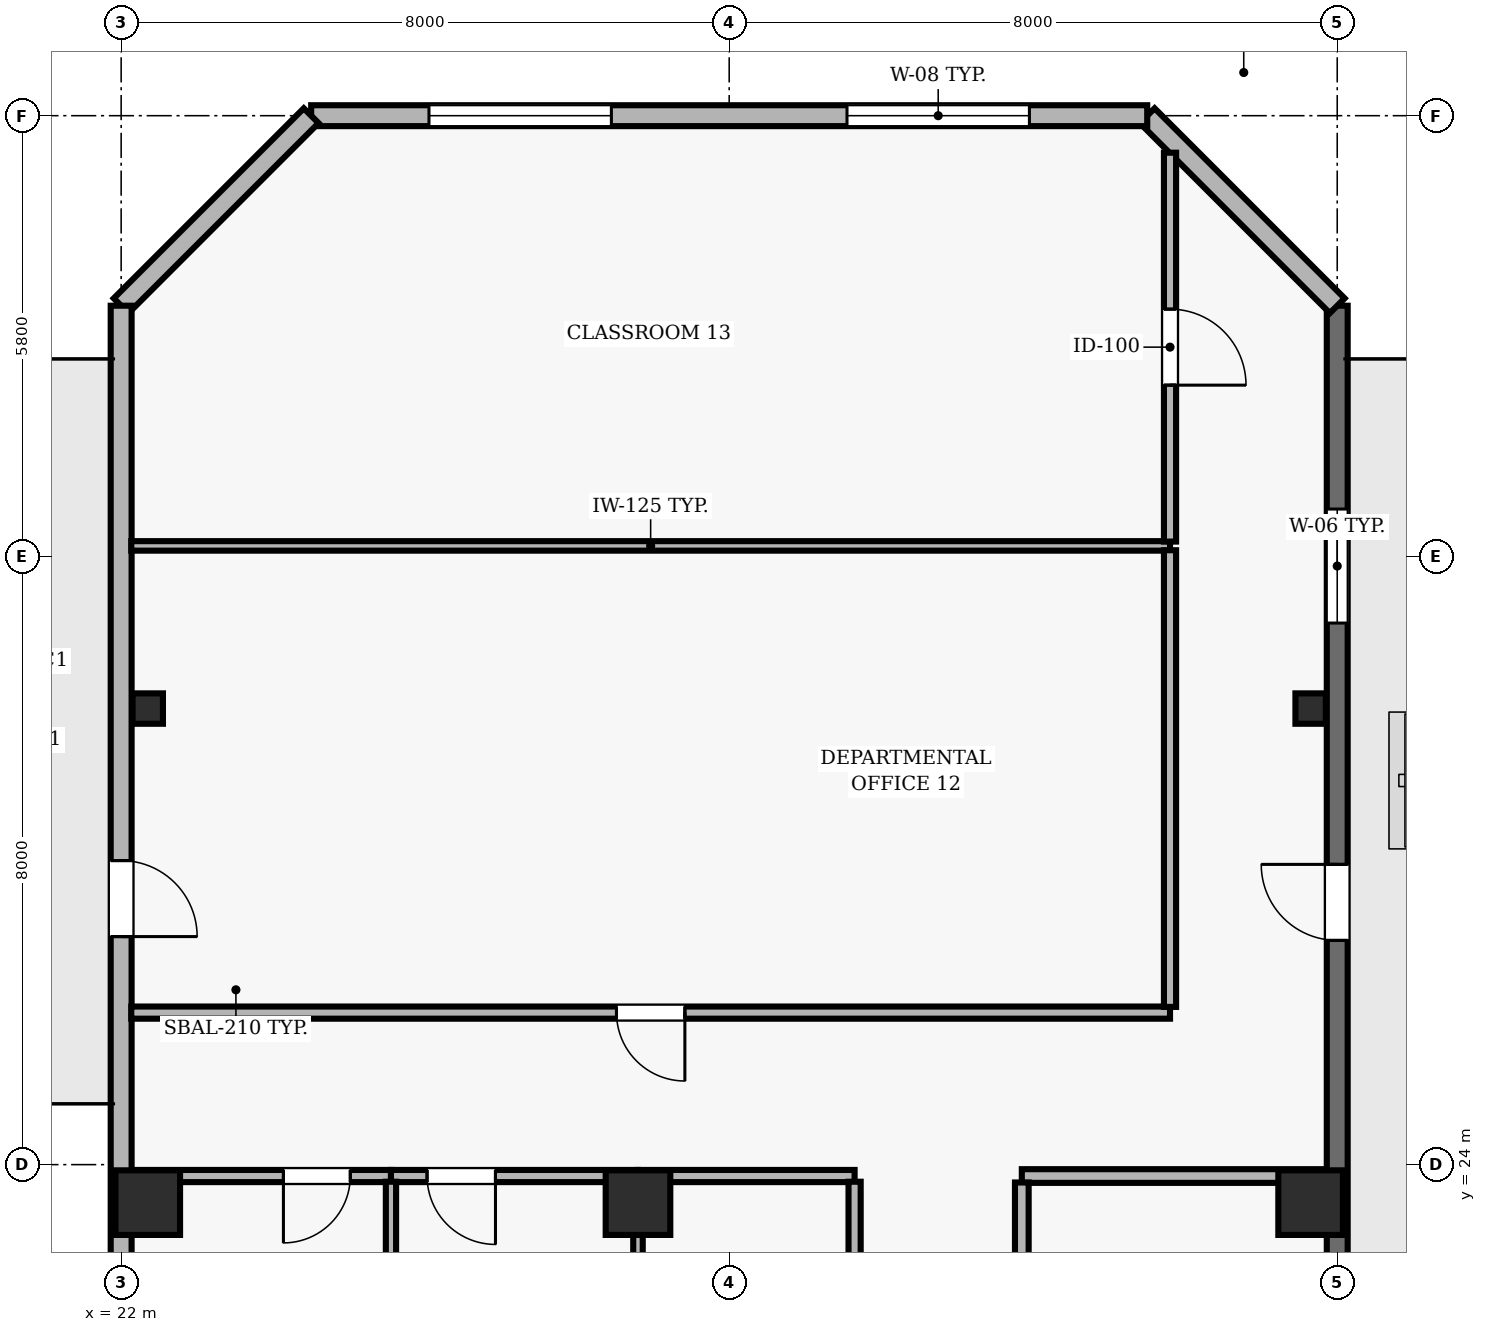
"""IFC4 building model, lengths in metres.
Left out: names, types, materials, properties, quantities, classifications, styles, units other than length and angle.
Written with IfcOpenShell. Run it as: python <this file> out.ifc"""

import sys

from ifc_helpers import new_model, si_unit, direction, frame, frame_2d, origin, origin_2d, place, context, subcontext, project, spatial, rectangle, hollow_rectangle, extrude, element, fill, save


model = new_model("IFC4")
c1 = context("Model", 3, precision=1e-05, world=origin(), true_north=direction((0.0, 1.0)))
c2 = subcontext(c1, "Body", "Model", "MODEL_VIEW")
j1 = project(units=[si_unit("LENGTHUNIT", "METRE"), si_unit("PLANEANGLEUNIT", "RADIAN")], contexts=[c1])
p1 = place(None, origin())
s1 = spatial("IfcSite", under=j1, at=p1, CompositionType="ELEMENT")
p2 = place(p1, origin())
s2 = spatial("IfcBuilding", under=s1, at=p2, CompositionType="ELEMENT")
p3 = place(p2, frame((0.0, 0.0, 283.3)))
s3 = spatial("IfcBuildingStorey", under=s2, at=p3, CompositionType="ELEMENT", Elevation=283.3)
for number, where, z_axis, x_axis in (
    (1, (22.35, 23.5, 0.0), (0.0, 0.0, 1.0), (1.0, 0.0, 0.0)),
    (2, (28.8, 23.5, 0.0), (0.0, 0.0, 1.0), (1.0, 0.0, 0.0)),
    (3, (37.65, 23.5, 0.0), (0.0, 0.0, 1.0), (1.0, 0.0, 0.0)),
):
    element("IfcColumn", number, at=place(p3, frame(where, z_axis=z_axis, x_axis=x_axis)), inside=s3, PredefinedType="COLUMN", context=c2, shape_type="SweptSolid", body=[
        extrude(rectangle(XDim=0.85, YDim=0.85, at=origin_2d()), origin(), (0.0, 0.0, 1.0), 3.9),
    ])
for number, where, z_axis, x_axis in (
    (4, (22.35, 30.0, 0.0), (0.0, 0.0, 1.0), (1.0, 0.0, 0.0)),
    (5, (37.65, 30.0, 0.0), (0.0, 0.0, 1.0), (1.0, 0.0, 0.0)),
):
    element("IfcColumn", number, at=place(p3, frame(where, z_axis=z_axis, x_axis=x_axis)), inside=s3, PredefinedType="COLUMN", context=c2, shape_type="SweptSolid", body=[
        extrude(hollow_rectangle(XDim=0.4, YDim=0.4, WallThickness=0.02, at=origin_2d()), origin(), (0.0, 0.0, 1.0), 3.9),
    ])
p4 = place(p3, frame((38.0, 21.6, 0.0), z_axis=(0.0, 0.0, 1.0), x_axis=(0.0, 1.0, 0.0)))
e6 = element("IfcWall", 6, at=p4, inside=s3, PredefinedType="SOLIDWALL", context=c2, shape_type="SweptSolid", body=[
    extrude(rectangle(XDim=13.7, YDim=0.275, at=frame_2d((6.85, 0.0))), origin(), (0.0, 0.0, 1.0), 3.69),
])
p5 = place(p4, frame((5.35, 0.0, 0.0)))
e7 = element("IfcOpeningElement", 7, at=p5, cuts=e6, PredefinedType="OPENING", context=c2, shape_type="SweptSolid", body=[
    extrude(rectangle(XDim=1.0, YDim=2.2, at=frame_2d((0.5, 1.1))), frame((0.0, 0.147, 0.0), z_axis=(0.0, -1.0, 0.0), x_axis=(1.0, 0.0, 0.0)), (0.0, 0.0, 1.0), 0.295),
])
p6 = place(p4, frame((9.525, 0.0, 0.9)))
e8 = element("IfcOpeningElement", 8, at=p6, cuts=e6, PredefinedType="OPENING", context=c2, shape_type="SweptSolid", body=[
    extrude(rectangle(XDim=1.5, YDim=1.8, at=frame_2d((0.75, 0.9))), frame((0.0, 0.147, 0.0), z_axis=(0.0, -1.0, 0.0), x_axis=(1.0, 0.0, 0.0)), (0.0, 0.0, 1.0), 0.295),
])
p7 = place(p3, frame((38.0, 35.3, 0.0), z_axis=(0.0, 0.0, 1.0), x_axis=(-0.707106781187, 0.707106781187, 0.0)))
e9 = element("IfcWall", 9, at=p7, inside=s3, PredefinedType="SOLIDWALL", context=c2, shape_type="SweptSolid", body=[
    extrude(rectangle(XDim=3.536, YDim=0.275, at=frame_2d((1.768, 0.0))), origin(), (0.0, 0.0, 1.0), 3.69),
])
p8 = place(p3, frame((35.5, 37.8, 0.0), z_axis=(0.0, 0.0, 1.0), x_axis=(-1.0, 0.0, 0.0)))
e10 = element("IfcWall", 10, at=p8, inside=s3, PredefinedType="SOLIDWALL", context=c2, shape_type="SweptSolid", body=[
    extrude(rectangle(XDim=11.0, YDim=0.275, at=frame_2d((5.5, 0.0))), origin(), (0.0, 0.0, 1.0), 3.69),
])
p9 = place(p8, frame((1.55, 0.0, 0.9)))
e11 = element("IfcOpeningElement", 11, at=p9, cuts=e10, PredefinedType="OPENING", context=c2, shape_type="SweptSolid", body=[
    extrude(rectangle(XDim=2.4, YDim=1.8, at=frame_2d((1.2, 0.9))), frame((0.0, 0.147, 0.0), z_axis=(0.0, -1.0, 0.0), x_axis=(1.0, 0.0, 0.0)), (0.0, 0.0, 1.0), 0.295),
])
p10 = place(p8, frame((7.05, 0.0, 0.9)))
e12 = element("IfcOpeningElement", 12, at=p10, cuts=e10, PredefinedType="OPENING", context=c2, shape_type="SweptSolid", body=[
    extrude(rectangle(XDim=2.4, YDim=1.8, at=frame_2d((1.2, 0.9))), frame((0.0, 0.147, 0.0), z_axis=(0.0, -1.0, 0.0), x_axis=(1.0, 0.0, 0.0)), (0.0, 0.0, 1.0), 0.295),
])
p11 = place(p3, frame((24.5, 37.8, 0.0), z_axis=(0.0, 0.0, 1.0), x_axis=(-0.707106781187, -0.707106781187, 0.0)))
e13 = element("IfcWall", 13, at=p11, inside=s3, PredefinedType="SOLIDWALL", context=c2, shape_type="SweptSolid", body=[
    extrude(rectangle(XDim=3.536, YDim=0.275, at=frame_2d((1.768, 0.0))), origin(), (0.0, 0.0, 1.0), 3.69),
])
p12 = place(p3, frame((22.0, 35.3, 0.0), z_axis=(0.0, 0.0, 1.0), x_axis=(0.0, -1.0, 0.0)))
e14 = element("IfcWall", 14, at=p12, inside=s3, PredefinedType="SOLIDWALL", context=c2, shape_type="SweptSolid", body=[
    extrude(rectangle(XDim=32.8, YDim=0.275, at=frame_2d((16.4, 0.0))), origin(), (0.0, 0.0, 1.0), 3.69),
])
p13 = place(p12, frame((7.3, 0.0, 0.0)))
e15 = element("IfcOpeningElement", 15, at=p13, cuts=e14, PredefinedType="OPENING", context=c2, shape_type="SweptSolid", body=[
    extrude(rectangle(XDim=1.0, YDim=2.2, at=frame_2d((0.5, 1.1))), frame((0.0, 0.147, 0.0), z_axis=(0.0, -1.0, 0.0), x_axis=(1.0, 0.0, 0.0)), (0.0, 0.0, 1.0), 0.295),
])
p14 = place(p12, frame((12.767, 0.0, 0.9)))
e16 = element("IfcOpeningElement", 16, at=p14, cuts=e14, PredefinedType="OPENING", context=c2, shape_type="SweptSolid", body=[
    extrude(rectangle(XDim=1.8, YDim=2.2, at=frame_2d((0.9, 1.1))), frame((0.0, 0.147, 0.0), z_axis=(0.0, -1.0, 0.0), x_axis=(1.0, 0.0, 0.0)), (0.0, 0.0, 1.0), 0.295),
])
p15 = place(p12, frame((18.233, 0.0, 0.9)))
e17 = element("IfcOpeningElement", 17, at=p15, cuts=e14, PredefinedType="OPENING", context=c2, shape_type="SweptSolid", body=[
    extrude(rectangle(XDim=1.8, YDim=2.2, at=frame_2d((0.9, 1.1))), frame((0.0, 0.147, 0.0), z_axis=(0.0, -1.0, 0.0), x_axis=(1.0, 0.0, 0.0)), (0.0, 0.0, 1.0), 0.295),
])
p16 = place(p12, frame((23.7, 0.0, 0.9)))
e18 = element("IfcOpeningElement", 18, at=p16, cuts=e14, PredefinedType="OPENING", context=c2, shape_type="SweptSolid", body=[
    extrude(rectangle(XDim=1.8, YDim=2.2, at=frame_2d((0.9, 1.1))), frame((0.0, 0.147, 0.0), z_axis=(0.0, -1.0, 0.0), x_axis=(1.0, 0.0, 0.0)), (0.0, 0.0, 1.0), 0.295),
])
p17 = place(p3, frame((25.55, 23.85, 0.0), z_axis=(0.0, 0.0, 1.0), x_axis=(-1.0, 0.0, 0.0)))
e19 = element("IfcWall", 19, at=p17, inside=s3, PredefinedType="PARTITIONING", context=c2, shape_type="SweptSolid", body=[
    extrude(rectangle(XDim=3.35, YDim=0.16, at=frame_2d((1.675, 0.0))), origin(), (0.0, 0.0, 1.0), 3.227),
])
p18 = place(p17, frame((0.535, 0.0, 0.0)))
e20 = element("IfcOpeningElement", 20, at=p18, cuts=e19, PredefinedType="OPENING", context=c2, shape_type="SweptSolid", body=[
    extrude(rectangle(XDim=0.88, YDim=2.1, at=frame_2d((0.44, 1.05))), frame((0.0, 0.09, 0.0), z_axis=(0.0, -1.0, 0.0), x_axis=(1.0, 0.0, 0.0)), (0.0, 0.0, 1.0), 0.18),
])
p19 = place(p3, frame((28.8, 23.85, 0.0), z_axis=(0.0, 0.0, 1.0), x_axis=(-1.0, 0.0, 0.0)))
e21 = element("IfcWall", 21, at=p19, inside=s3, PredefinedType="PARTITIONING", context=c2, shape_type="SweptSolid", body=[
    extrude(rectangle(XDim=3.25, YDim=0.16, at=frame_2d((1.625, 0.0))), origin(), (0.0, 0.0, 1.0), 3.227),
])
p20 = place(p19, frame((1.875, 0.0, 0.0)))
e22 = element("IfcOpeningElement", 22, at=p20, cuts=e21, PredefinedType="OPENING", context=c2, shape_type="SweptSolid", body=[
    extrude(rectangle(XDim=0.9, YDim=2.1, at=frame_2d((0.45, 1.05))), frame((0.0, 0.09, 0.0), z_axis=(0.0, -1.0, 0.0), x_axis=(1.0, 0.0, 0.0)), (0.0, 0.0, 1.0), 0.18),
])
p21 = place(p3, frame((31.65, 23.85, 0.0), z_axis=(0.0, 0.0, 1.0), x_axis=(-1.0, 0.0, 0.0)))
e23 = element("IfcWall", 23, at=p21, inside=s3, PredefinedType="PARTITIONING", context=c2, shape_type="SweptSolid", body=[
    extrude(rectangle(XDim=2.85, YDim=0.16, at=frame_2d((1.425, 0.0))), origin(), (0.0, 0.0, 1.0), 3.227),
])
p22 = place(p3, frame((35.8, 26.0, 0.0), z_axis=(0.0, 0.0, 1.0), x_axis=(-1.0, 0.0, 0.0)))
e24 = element("IfcWall", 24, at=p22, inside=s3, PredefinedType="PARTITIONING", context=c2, shape_type="SweptSolid", body=[
    extrude(rectangle(XDim=13.667, YDim=0.16, at=frame_2d((6.833, 0.0))), origin(), (0.0, 0.0, 1.0), 3.69),
])
p23 = place(p22, frame((6.383, 0.0, 0.0)))
e25 = element("IfcOpeningElement", 25, at=p23, cuts=e24, PredefinedType="OPENING", context=c2, shape_type="SweptSolid", body=[
    extrude(rectangle(XDim=0.9, YDim=2.1, at=frame_2d((0.45, 1.05))), frame((0.0, 0.09, 0.0), z_axis=(0.0, -1.0, 0.0), x_axis=(1.0, 0.0, 0.0)), (0.0, 0.0, 1.0), 0.18),
])
p24 = place(p3, frame((35.8, 32.14, 0.0), z_axis=(0.0, 0.0, 1.0), x_axis=(-1.0, 0.0, 0.0)))
e26 = element("IfcWall", 26, at=p24, inside=s3, PredefinedType="PARTITIONING", context=c2, shape_type="SweptSolid", body=[
    extrude(rectangle(XDim=13.667, YDim=0.125, at=frame_2d((6.833, 0.0))), origin(), (0.0, 0.0, 1.0), 3.69),
])
p25 = place(p3, frame((37.85, 23.85, 0.0), z_axis=(0.0, 0.0, 1.0), x_axis=(-1.0, 0.0, 0.0)))
e27 = element("IfcWall", 27, at=p25, inside=s3, PredefinedType="PARTITIONING", context=c2, shape_type="SweptSolid", body=[
    extrude(rectangle(XDim=4.0, YDim=0.18, at=frame_2d((2.0, 0.0))), origin(), (0.0, 0.0, 1.0), 3.227),
])
p26 = place(p3, frame((25.55, 19.16, 0.0), z_axis=(0.0, 0.0, 1.0), x_axis=(0.0, 1.0, 0.0)))
e28 = element("IfcWall", 28, at=p26, inside=s3, PredefinedType="PARTITIONING", context=c2, shape_type="SweptSolid", body=[
    extrude(rectangle(XDim=4.615, YDim=0.135, at=frame_2d((2.308, 0.0))), origin(), (0.0, 0.0, 1.0), 3.69),
])
p27 = place(p3, frame((28.8, 23.775, 0.0), z_axis=(0.0, 0.0, 1.0), x_axis=(0.0, -1.0, 0.0)))
e29 = element("IfcWall", 29, at=p27, inside=s3, PredefinedType="PARTITIONING", context=c2, shape_type="SweptSolid", body=[
    extrude(rectangle(XDim=4.615, YDim=0.125, at=frame_2d((2.308, 0.0))), origin(), (0.0, 0.0, 1.0), 3.69),
])
p28 = place(p3, frame((31.65, 19.01, 0.0), z_axis=(0.0, 0.0, 1.0), x_axis=(0.0, 1.0, 0.0)))
e30 = element("IfcWall", 30, at=p28, inside=s3, PredefinedType="PARTITIONING", context=c2, shape_type="SweptSolid", body=[
    extrude(rectangle(XDim=4.765, YDim=0.16, at=frame_2d((2.382, 0.0))), origin(), (0.0, 0.0, 1.0), 3.69),
])
p29 = place(p28, frame((1.932, 0.0, 0.0)))
e31 = element("IfcOpeningElement", 31, at=p29, cuts=e30, PredefinedType="OPENING", context=c2, shape_type="SweptSolid", body=[
    extrude(rectangle(XDim=0.9, YDim=2.1, at=frame_2d((0.45, 1.05))), frame((0.0, 0.09, 0.0), z_axis=(0.0, -1.0, 0.0), x_axis=(1.0, 0.0, 0.0)), (0.0, 0.0, 1.0), 0.18),
])
p30 = place(p3, frame((33.85, 17.735, 0.0), z_axis=(0.0, 0.0, 1.0), x_axis=(0.0, 1.0, 0.0)))
e32 = element("IfcWall", 32, at=p30, inside=s3, PredefinedType="PARTITIONING", context=c2, shape_type="SweptSolid", body=[
    extrude(rectangle(XDim=6.03, YDim=0.18, at=frame_2d((3.015, 0.0))), origin(), (0.0, 0.0, 1.0), 3.69),
])
p31 = place(p30, frame((2.54, 0.0, 0.0)))
e33 = element("IfcOpeningElement", 33, at=p31, cuts=e32, PredefinedType="OPENING", context=c2, shape_type="SweptSolid", body=[
    extrude(rectangle(XDim=0.95, YDim=2.1, at=frame_2d((0.475, 1.05))), frame((0.0, 0.1, 0.0), z_axis=(0.0, -1.0, 0.0), x_axis=(1.0, 0.0, 0.0)), (0.0, 0.0, 1.0), 0.2),
])
p32 = place(p3, frame((35.8, 32.083, 0.0), z_axis=(0.0, 0.0, 1.0), x_axis=(0.0, -1.0, 0.0)))
e34 = element("IfcWall", 34, at=p32, inside=s3, PredefinedType="PARTITIONING", context=c2, shape_type="SweptSolid", body=[
    extrude(rectangle(XDim=6.008, YDim=0.16, at=frame_2d((3.004, 0.0))), origin(), (0.0, 0.0, 1.0), 3.69),
])
p33 = place(p3, frame((35.8, 37.313, 0.0), z_axis=(0.0, 0.0, 1.0), x_axis=(0.0, -1.0, 0.0)))
e35 = element("IfcWall", 35, at=p33, inside=s3, PredefinedType="PARTITIONING", context=c2, shape_type="SweptSolid", body=[
    extrude(rectangle(XDim=5.116, YDim=0.16, at=frame_2d((2.558, 0.0))), origin(), (0.0, 0.0, 1.0), 3.69),
])
p34 = place(p33, frame((2.058, 0.0, 0.0)))
e36 = element("IfcOpeningElement", 36, at=p34, cuts=e35, PredefinedType="OPENING", context=c2, shape_type="SweptSolid", body=[
    extrude(rectangle(XDim=1.0, YDim=2.1, at=frame_2d((0.5, 1.05))), frame((0.0, 0.09, 0.0), z_axis=(0.0, -1.0, 0.0), x_axis=(1.0, 0.0, 0.0)), (0.0, 0.0, 1.0), 0.18),
])
p35 = place(p5, origin())
e37 = element("IfcDoor", 37, at=p35, inside=s3, OperationType="SINGLE_SWING_RIGHT", PredefinedType="DOOR", context=c2, shape_type="SweptSolid", body=[
    extrude(rectangle(XDim=1.0, YDim=2.2, at=frame_2d((0.5, 1.1))), frame((0.0, 0.025, 0.0), z_axis=(0.0, -1.0, 0.0), x_axis=(1.0, 0.0, 0.0)), (0.0, 0.0, 1.0), 0.05),
])
fill(e7, e37)
p36 = place(p6, origin())
e38 = element("IfcWindow", 38, at=p36, inside=s3, PartitioningType="SINGLE_PANEL", PredefinedType="WINDOW", context=c2, shape_type="SweptSolid", body=[
    extrude(rectangle(XDim=1.5, YDim=1.8, at=frame_2d((0.75, 0.9))), frame((0.0, 0.03, 0.0), z_axis=(0.0, -1.0, 0.0), x_axis=(1.0, 0.0, 0.0)), (0.0, 0.0, 1.0), 0.06),
])
fill(e8, e38)
p37 = place(p9, origin())
e39 = element("IfcWindow", 39, at=p37, inside=s3, PartitioningType="SINGLE_PANEL", PredefinedType="WINDOW", context=c2, shape_type="SweptSolid", body=[
    extrude(rectangle(XDim=2.4, YDim=1.8, at=frame_2d((1.2, 0.9))), frame((0.0, 0.03, 0.0), z_axis=(0.0, -1.0, 0.0), x_axis=(1.0, 0.0, 0.0)), (0.0, 0.0, 1.0), 0.06),
])
fill(e11, e39)
p38 = place(p10, origin())
e40 = element("IfcWindow", 40, at=p38, inside=s3, PartitioningType="SINGLE_PANEL", PredefinedType="WINDOW", context=c2, shape_type="SweptSolid", body=[
    extrude(rectangle(XDim=2.4, YDim=1.8, at=frame_2d((1.2, 0.9))), frame((0.0, 0.03, 0.0), z_axis=(0.0, -1.0, 0.0), x_axis=(1.0, 0.0, 0.0)), (0.0, 0.0, 1.0), 0.06),
])
fill(e12, e40)
p39 = place(p13, origin())
e41 = element("IfcDoor", 41, at=p39, inside=s3, OperationType="SINGLE_SWING_RIGHT", PredefinedType="DOOR", context=c2, shape_type="SweptSolid", body=[
    extrude(rectangle(XDim=1.0, YDim=2.2, at=frame_2d((0.5, 1.1))), frame((0.0, 0.025, 0.0), z_axis=(0.0, -1.0, 0.0), x_axis=(1.0, 0.0, 0.0)), (0.0, 0.0, 1.0), 0.05),
])
fill(e15, e41)
p40 = place(p18, origin())
e42 = element("IfcDoor", 42, at=p40, inside=s3, OperationType="SINGLE_SWING_RIGHT", PredefinedType="DOOR", context=c2, shape_type="SweptSolid", body=[
    extrude(rectangle(XDim=0.88, YDim=2.1, at=frame_2d((0.44, 1.05))), frame((0.0, 0.025, 0.0), z_axis=(0.0, -1.0, 0.0), x_axis=(1.0, 0.0, 0.0)), (0.0, 0.0, 1.0), 0.05),
])
fill(e20, e42)
p41 = place(p20, origin())
e43 = element("IfcDoor", 43, at=p41, inside=s3, OperationType="SINGLE_SWING_LEFT", PredefinedType="DOOR", context=c2, shape_type="SweptSolid", body=[
    extrude(rectangle(XDim=0.9, YDim=2.1, at=frame_2d((0.45, 1.05))), frame((0.0, 0.025, 0.0), z_axis=(0.0, -1.0, 0.0), x_axis=(1.0, 0.0, 0.0)), (0.0, 0.0, 1.0), 0.05),
])
fill(e22, e43)
p42 = place(p23, origin())
e44 = element("IfcDoor", 44, at=p42, inside=s3, OperationType="SINGLE_SWING_LEFT", PredefinedType="DOOR", context=c2, shape_type="SweptSolid", body=[
    extrude(rectangle(XDim=0.9, YDim=2.1, at=frame_2d((0.45, 1.05))), frame((0.0, 0.025, 0.0), z_axis=(0.0, -1.0, 0.0), x_axis=(1.0, 0.0, 0.0)), (0.0, 0.0, 1.0), 0.05),
])
fill(e25, e44)
p43 = place(p34, origin())
e45 = element("IfcDoor", 45, at=p43, inside=s3, OperationType="SINGLE_SWING_RIGHT", PredefinedType="DOOR", context=c2, shape_type="SweptSolid", body=[
    extrude(rectangle(XDim=1.0, YDim=2.1, at=frame_2d((0.5, 1.05))), frame((0.0, 0.025, 0.0), z_axis=(0.0, -1.0, 0.0), x_axis=(1.0, 0.0, 0.0)), (0.0, 0.0, 1.0), 0.05),
])
fill(e36, e45)
save(model, sys.argv[1])
